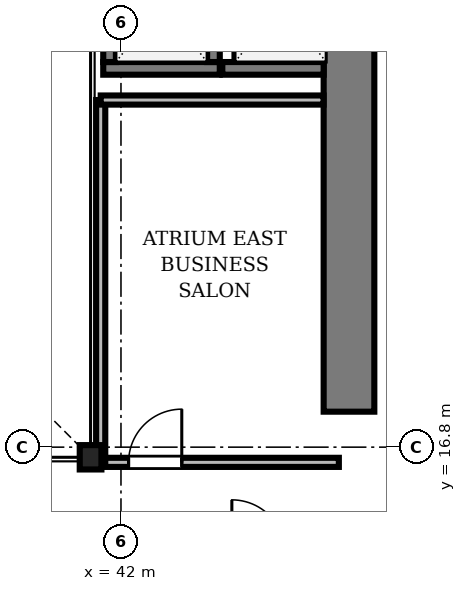
"""IFC4 building model, lengths in metres.
Left out: names, types, materials, properties, quantities, classifications, styles, units other than length and angle.
Written with IfcOpenShell. Run it as: python <this file> out.ifc"""

import sys

from ifc_helpers import new_model, si_unit, direction, frame, frame_2d, origin, origin_2d, place, context, subcontext, project, spatial, rectangle, i_section, extrude, source, transform, mapped, element, fill, save


model = new_model("IFC4")
c1 = context("Model", 3, precision=1e-05, world=origin(), true_north=direction((0.0, 1.0)))
c2 = subcontext(c1, "Body", "Model", "MODEL_VIEW")
j1 = project(units=[si_unit("LENGTHUNIT", "METRE"), si_unit("PLANEANGLEUNIT", "RADIAN")], contexts=[c1])
p1 = place(None, origin())
s1 = spatial("IfcSite", under=j1, at=p1, CompositionType="ELEMENT")
p2 = place(p1, origin())
s2 = spatial("IfcBuilding", under=s1, at=p2, CompositionType="ELEMENT")
p3 = place(p2, frame((0.0, 0.0, 38.55)))
s3 = spatial("IfcBuildingStorey", under=s2, at=p3, CompositionType="ELEMENT", Elevation=38.55)
m1 = source(origin(), c2, "Body", "SweptSolid", [
    extrude(rectangle(XDim=13.15, YDim=1.0, at=frame_2d((6.575, 0.0))), origin(), (0.0, 0.0, 1.0), 3.41),
])
p4 = place(p3, frame((46.5, 17.5, 0.0), z_axis=(0.0, 0.0, 1.0), x_axis=(0.0, 1.0, 0.0)))
e1 = element("IfcWall", 1, at=p4, inside=s3, PredefinedType="SHEAR", context=c2, shape_type="MappedRepresentation", body=[
    mapped(m1, transform((0.0, 0.0, 0.0), scale=1.0)),
])
m2 = source(origin(), c2, "Body", "SweptSolid", [
    extrude(i_section(OverallWidth=0.428, OverallDepth=0.481, WebThickness=0.04, FlangeThickness=0.063, FilletRadius=0.015, at=origin_2d()), origin(), (0.0, 0.0, 1.0), 3.41),
])
p5 = place(p3, frame((41.4, 16.6, 0.0), z_axis=(0.0, 0.0, 1.0), x_axis=(1.0, 0.0, 0.0)))
e2 = element("IfcColumn", 2, at=p5, inside=s3, PredefinedType="COLUMN", context=c2, shape_type="MappedRepresentation", body=[
    mapped(m2, transform((0.0, 0.0, 0.0), scale=1.0)),
])
m3 = source(origin(), c2, "Body", "SweptSolid", [
    extrude(rectangle(XDim=2.3, YDim=0.25, at=frame_2d((1.15, 0.0))), origin(), (0.0, 0.0, 1.0), 3.41),
])
for number, where, z_axis, x_axis in (
    (3, (41.65, 24.275, 0.0), (0.0, 0.0, 1.0), (1.0, 0.0, 0.0)),
    (4, (41.775, 24.4, 0.0), (0.0, 0.0, 1.0), (0.0, 1.0, 0.0)),
    (5, (43.825, 24.4, 0.0), (0.0, 0.0, 1.0), (0.0, 1.0, 0.0)),
):
    element("IfcWall", number, at=place(p3, frame(where, z_axis=z_axis, x_axis=x_axis)), inside=s3, PredefinedType="SOLIDWALL", context=c2, shape_type="MappedRepresentation", body=[
        mapped(m3, transform((0.0, 0.0, 0.0), scale=1.0)),
    ])
m4 = source(origin(), c2, "Body", "SweptSolid", [
    extrude(rectangle(XDim=2.0, YDim=0.25, at=frame_2d((1.0, 0.0))), origin(), (0.0, 0.0, 1.0), 3.41),
])
p6 = place(p3, frame((44.0, 24.275, 0.0), z_axis=(0.0, 0.0, 1.0), x_axis=(1.0, 0.0, 0.0)))
e6 = element("IfcWall", 6, at=p6, inside=s3, PredefinedType="SOLIDWALL", context=c2, shape_type="MappedRepresentation", body=[
    mapped(m4, transform((0.0, 0.0, 0.0), scale=1.0)),
])
m5 = source(origin(), c2, "Body", "SweptSolid", [
    extrude(rectangle(XDim=4.7, YDim=0.18, at=frame_2d((2.35, 0.0))), origin(), (0.0, 0.0, 1.0), 2.802),
])
p7 = place(p3, frame((41.6, 16.5, 0.0), z_axis=(0.0, 0.0, 1.0), x_axis=(1.0, 0.0, 0.0)))
e7 = element("IfcWall", 7, at=p7, inside=s3, PredefinedType="PARTITIONING", context=c2, shape_type="MappedRepresentation", body=[
    mapped(m5, transform((0.0, 0.0, 0.0), scale=1.0)),
])
m6 = source(origin(), c2, "Body", "SweptSolid", [
    extrude(rectangle(XDim=1.05, YDim=2.2, at=frame_2d((0.525, 1.1))), frame((0.0, 0.1, 0.0), z_axis=(0.0, -1.0, 0.0), x_axis=(1.0, 0.0, 0.0)), (0.0, 0.0, 1.0), 0.2),
])
p8 = place(p7, frame((0.55, 0.0, 0.0)))
e8 = element("IfcOpeningElement", 8, at=p8, cuts=e7, PredefinedType="OPENING", context=c2, shape_type="MappedRepresentation", body=[
    mapped(m6, transform((0.0, 0.0, 0.0), scale=1.0)),
])
m7 = source(origin(), c2, "Body", "SweptSolid", [
    extrude(rectangle(XDim=7.15, YDim=0.18, at=frame_2d((3.575, 0.0))), origin(), (0.0, 0.0, 1.0), 2.802),
])
p9 = place(p3, frame((41.6, 16.5, 0.0), z_axis=(0.0, 0.0, 1.0), x_axis=(0.0, 1.0, 0.0)))
e9 = element("IfcWall", 9, at=p9, inside=s3, PredefinedType="PARTITIONING", context=c2, shape_type="MappedRepresentation", body=[
    mapped(m7, transform((0.0, 0.0, 0.0), scale=1.0)),
])
m8 = source(origin(), c2, "Body", "SweptSolid", [
    extrude(rectangle(XDim=4.398, YDim=0.18, at=frame_2d((2.199, 0.0))), origin(), (0.0, 0.0, 1.0), 3.41),
])
p10 = place(p3, frame((41.6, 23.65, 0.0), z_axis=(0.0, 0.0, 1.0), x_axis=(1.0, 0.0, 0.0)))
e10 = element("IfcWall", 10, at=p10, inside=s3, PredefinedType="PARTITIONING", context=c2, shape_type="MappedRepresentation", body=[
    mapped(m8, transform((0.0, 0.0, 0.0), scale=1.0)),
])
m9 = source(origin(), c2, "Body", "SweptSolid", [
    extrude(rectangle(XDim=1.05, YDim=2.2, at=frame_2d((0.525, 1.1))), frame((0.0, 0.025, 0.0), z_axis=(0.0, -1.0, 0.0), x_axis=(1.0, 0.0, 0.0)), (0.0, 0.0, 1.0), 0.05),
])
p11 = place(p8, origin())
e11 = element("IfcDoor", 11, at=p11, inside=s3, OperationType="SINGLE_SWING_RIGHT", PredefinedType="DOOR", context=c2, shape_type="MappedRepresentation", body=[
    mapped(m9, transform((0.0, 0.0, 0.0), scale=1.0)),
])
fill(e8, e11)
save(model, sys.argv[1])
